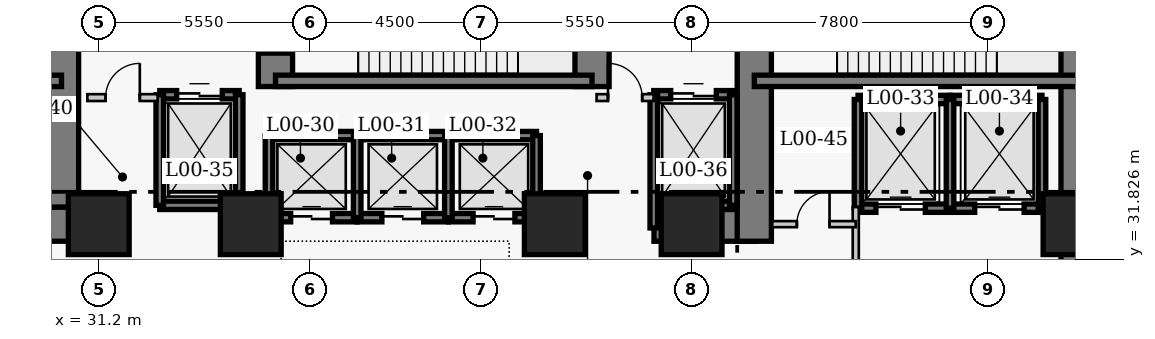
"""IFC4 building model, lengths in metres.
Left out: names, types, materials, properties, quantities, classifications, styles, units other than length and angle.
Written with IfcOpenShell. Run it as: python <this file> out.ifc"""

import sys

from ifc_helpers import new_model, si_unit, direction, frame, frame_2d, origin, origin_2d, place, context, subcontext, project, spatial, rectangle, extrude, element, fill, save


model = new_model("IFC4")
c1 = context("Model", 3, precision=1e-05, world=origin(), true_north=direction((0.0, 1.0)))
c2 = subcontext(c1, "Body", "Model", "MODEL_VIEW")
j1 = project(units=[si_unit("LENGTHUNIT", "METRE"), si_unit("PLANEANGLEUNIT", "RADIAN")], contexts=[c1])
p1 = place(None, origin())
s1 = spatial("IfcSite", under=j1, at=p1, CompositionType="ELEMENT")
p2 = place(p1, origin())
s2 = spatial("IfcBuilding", under=s1, at=p2, CompositionType="ELEMENT")
p3 = place(p2, origin())
s3 = spatial("IfcBuildingStorey", under=s2, at=p3, CompositionType="ELEMENT", Elevation=0.0)
p4 = place(p3, frame((56.97, 27.05, 0.0), z_axis=(0.0, 0.0, 1.0), x_axis=(0.0, 1.0, 0.0)))
e1 = element("IfcWall", 1, at=p4, inside=s3, PredefinedType="SHEAR", context=c2, shape_type="SweptSolid", body=[
    extrude(rectangle(XDim=13.72, YDim=0.9, at=frame_2d((6.86, 0.0))), origin(), (0.0, 0.0, 1.0), 5.4),
])
p5 = place(p3, frame((28.45, 32.75, 0.0), z_axis=(0.0, 0.0, 1.0), x_axis=(1.0, 0.0, 0.0)))
e2 = element("IfcWall", 2, at=p5, inside=s3, PredefinedType="SHEAR", context=c2, shape_type="SweptSolid", body=[
    extrude(rectangle(XDim=2.4, YDim=0.9, at=frame_2d((1.2, 0.0))), origin(), (0.0, 0.0, 1.0), 5.4),
])
p6 = place(p3, frame((45.81, 32.75, 0.0), z_axis=(0.0, 0.0, 1.0), x_axis=(1.0, 0.0, 0.0)))
e3 = element("IfcWall", 3, at=p6, inside=s3, PredefinedType="SHEAR", context=c2, shape_type="SweptSolid", body=[
    extrude(rectangle(XDim=2.64, YDim=0.9, at=frame_2d((1.32, 0.0))), origin(), (0.0, 0.0, 1.0), 5.4),
])
p7 = place(p3, frame((30.22, 33.2, 0.0), z_axis=(0.0, 0.0, 1.0), x_axis=(0.0, 1.0, 0.0)))
e4 = element("IfcWall", 4, at=p7, inside=s3, PredefinedType="SHEAR", context=c2, shape_type="SweptSolid", body=[
    extrude(rectangle(XDim=7.12, YDim=0.9, at=frame_2d((3.56, 0.0))), origin(), (0.0, 0.0, 1.0), 5.4),
])
p8 = place(p3, frame((35.85, 36.37, 0.0), z_axis=(0.0, 0.0, 1.0), x_axis=(0.0, 1.0, 0.0)))
e5 = element("IfcWall", 5, at=p8, inside=s3, PredefinedType="SHEAR", context=c2, shape_type="SweptSolid", body=[
    extrude(rectangle(XDim=3.95, YDim=0.9, at=frame_2d((1.975, 0.0))), origin(), (0.0, 0.0, 1.0), 5.4),
])
p9 = place(p8, frame((0.88, 0.0, 0.0)))
e6 = element("IfcOpeningElement", 6, at=p9, cuts=e5, PredefinedType="OPENING", context=c2, shape_type="SweptSolid", body=[
    extrude(rectangle(XDim=1.1, YDim=2.15, at=frame_2d((0.55, 1.075))), frame((0.0, 0.46, 0.0), z_axis=(0.0, -1.0, 0.0), x_axis=(1.0, 0.0, 0.0)), (0.0, 0.0, 1.0), 0.92),
])
p10 = place(p3, frame((44.18, 36.37, 0.0), z_axis=(0.0, 0.0, 1.0), x_axis=(0.0, 1.0, 0.0)))
e7 = element("IfcWall", 7, at=p10, inside=s3, PredefinedType="SHEAR", context=c2, shape_type="SweptSolid", body=[
    extrude(rectangle(XDim=3.95, YDim=0.9, at=frame_2d((1.975, 0.0))), origin(), (0.0, 0.0, 1.0), 5.4),
])
p11 = place(p3, frame((48.45, 32.3, 0.0), z_axis=(0.0, 0.0, 1.0), x_axis=(0.0, 1.0, 0.0)))
e8 = element("IfcWall", 8, at=p11, inside=s3, PredefinedType="SHEAR", context=c2, shape_type="SweptSolid", body=[
    extrude(rectangle(XDim=8.02, YDim=0.9, at=frame_2d((4.01, 0.0))), origin(), (0.0, 0.0, 1.0), 5.4),
])
p12 = place(p11, frame((5.9, 0.0, 0.0)))
e9 = element("IfcOpeningElement", 9, at=p12, cuts=e8, PredefinedType="OPENING", context=c2, shape_type="SweptSolid", body=[
    extrude(rectangle(XDim=1.1, YDim=2.15, at=frame_2d((0.55, 1.075))), frame((0.0, 0.46, 0.0), z_axis=(0.0, -1.0, 0.0), x_axis=(1.0, 0.0, 0.0)), (0.0, 0.0, 1.0), 0.92),
])
p13 = place(p3, frame((21.9, 36.52, 0.0), z_axis=(0.0, 0.0, 1.0), x_axis=(1.0, 0.0, 0.0)))
e10 = element("IfcWall", 10, at=p13, inside=s3, PredefinedType="SHEAR", context=c2, shape_type="SweptSolid", body=[
    extrude(rectangle(XDim=8.32, YDim=0.3, at=frame_2d((4.16, 0.0))), origin(), (0.0, 0.0, 1.0), 5.4),
])
p14 = place(p13, frame((0.9, 0.0, 0.0)))
e11 = element("IfcOpeningElement", 11, at=p14, cuts=e10, PredefinedType="OPENING", context=c2, shape_type="SweptSolid", body=[
    extrude(rectangle(XDim=1.1, YDim=2.15, at=frame_2d((0.55, 1.075))), frame((0.0, 0.16, 0.0), z_axis=(0.0, -1.0, 0.0), x_axis=(1.0, 0.0, 0.0)), (0.0, 0.0, 1.0), 0.32),
])
p15 = place(p3, frame((35.85, 36.52, 0.0), z_axis=(0.0, 0.0, 1.0), x_axis=(1.0, 0.0, 0.0)))
e12 = element("IfcWall", 12, at=p15, inside=s3, PredefinedType="SHEAR", context=c2, shape_type="SweptSolid", body=[
    extrude(rectangle(XDim=8.33, YDim=0.3, at=frame_2d((4.165, 0.0))), origin(), (0.0, 0.0, 1.0), 5.4),
])
p16 = place(p3, frame((48.45, 36.52, 0.0), z_axis=(0.0, 0.0, 1.0), x_axis=(1.0, 0.0, 0.0)))
e13 = element("IfcWall", 13, at=p16, inside=s3, PredefinedType="SHEAR", context=c2, shape_type="SweptSolid", body=[
    extrude(rectangle(XDim=8.52, YDim=0.3, at=frame_2d((4.26, 0.0))), origin(), (0.0, 0.0, 1.0), 5.4),
])
for number, where, z_axis, x_axis in (
    (14, (31.2, 32.75, 0.0), (0.0, 0.0, 1.0), (1.0, 0.0, 0.0)),
    (15, (35.2, 32.75, 0.0), (0.0, 0.0, 1.0), (1.0, 0.0, 0.0)),
    (16, (43.2, 32.75, 0.0), (0.0, 0.0, 1.0), (1.0, 0.0, 0.0)),
    (17, (46.8, 32.75, 0.0), (0.0, 0.0, 1.0), (1.0, 0.0, 0.0)),
    (18, (56.85, 32.75, 0.0), (0.0, 0.0, 1.0), (1.0, 0.0, 0.0)),
):
    element("IfcColumn", number, at=place(p3, frame(where, z_axis=z_axis, x_axis=x_axis)), inside=s3, PredefinedType="COLUMN", context=c2, shape_type="SweptSolid", body=[
        extrude(rectangle(XDim=1.6, YDim=1.6, at=origin_2d()), origin(), (0.0, 0.0, 1.0), 5.4),
    ])
p17 = place(p3, frame((35.68, 35.08, 0.0), z_axis=(0.0, 0.0, 1.0), x_axis=(1.0, 0.0, 0.0)))
e19 = element("IfcWall", 19, at=p17, inside=s3, PredefinedType="SHEAR", context=c2, shape_type="SweptSolid", body=[
    extrude(rectangle(XDim=2.32, YDim=0.22, at=frame_2d((1.16, 0.0))), origin(), (0.0, 0.0, 1.0), 5.4),
])
p18 = place(p3, frame((35.68, 32.92, 0.0), z_axis=(0.0, 0.0, 1.0), x_axis=(1.0, 0.0, 0.0)))
e20 = element("IfcWall", 20, at=p18, inside=s3, PredefinedType="SHEAR", context=c2, shape_type="SweptSolid", body=[
    extrude(rectangle(XDim=2.32, YDim=0.22, at=frame_2d((1.16, 0.0))), origin(), (0.0, 0.0, 1.0), 5.4),
])
p19 = place(p18, frame((0.57, 0.0, 0.0)))
e21 = element("IfcOpeningElement", 21, at=p19, cuts=e20, PredefinedType="OPENING", context=c2, shape_type="SweptSolid", body=[
    extrude(rectangle(XDim=1.1, YDim=2.15, at=frame_2d((0.55, 1.075))), frame((0.0, 0.12, 0.0), z_axis=(0.0, -1.0, 0.0), x_axis=(1.0, 0.0, 0.0)), (0.0, 0.0, 1.0), 0.24),
])
p20 = place(p3, frame((35.68, 32.92, 0.0), z_axis=(0.0, 0.0, 1.0), x_axis=(0.0, 1.0, 0.0)))
e22 = element("IfcWall", 22, at=p20, inside=s3, PredefinedType="SHEAR", context=c2, shape_type="SweptSolid", body=[
    extrude(rectangle(XDim=2.16, YDim=0.2, at=frame_2d((1.08, 0.0))), origin(), (0.0, 0.0, 1.0), 5.4),
])
p21 = place(p3, frame((38.0, 35.08, 0.0), z_axis=(0.0, 0.0, 1.0), x_axis=(1.0, 0.0, 0.0)))
e23 = element("IfcWall", 23, at=p21, inside=s3, PredefinedType="SHEAR", context=c2, shape_type="SweptSolid", body=[
    extrude(rectangle(XDim=2.4, YDim=0.22, at=frame_2d((1.2, 0.0))), origin(), (0.0, 0.0, 1.0), 5.4),
])
p22 = place(p3, frame((38.0, 32.92, 0.0), z_axis=(0.0, 0.0, 1.0), x_axis=(1.0, 0.0, 0.0)))
e24 = element("IfcWall", 24, at=p22, inside=s3, PredefinedType="SHEAR", context=c2, shape_type="SweptSolid", body=[
    extrude(rectangle(XDim=2.4, YDim=0.22, at=frame_2d((1.2, 0.0))), origin(), (0.0, 0.0, 1.0), 5.4),
])
p23 = place(p22, frame((0.65, 0.0, 0.0)))
e25 = element("IfcOpeningElement", 25, at=p23, cuts=e24, PredefinedType="OPENING", context=c2, shape_type="SweptSolid", body=[
    extrude(rectangle(XDim=1.1, YDim=2.15, at=frame_2d((0.55, 1.075))), frame((0.0, 0.12, 0.0), z_axis=(0.0, -1.0, 0.0), x_axis=(1.0, 0.0, 0.0)), (0.0, 0.0, 1.0), 0.24),
])
p24 = place(p3, frame((38.0, 32.92, 0.0), z_axis=(0.0, 0.0, 1.0), x_axis=(0.0, 1.0, 0.0)))
e26 = element("IfcWall", 26, at=p24, inside=s3, PredefinedType="SHEAR", context=c2, shape_type="SweptSolid", body=[
    extrude(rectangle(XDim=2.16, YDim=0.2, at=frame_2d((1.08, 0.0))), origin(), (0.0, 0.0, 1.0), 5.4),
])
p25 = place(p3, frame((40.4, 35.08, 0.0), z_axis=(0.0, 0.0, 1.0), x_axis=(1.0, 0.0, 0.0)))
e27 = element("IfcWall", 27, at=p25, inside=s3, PredefinedType="SHEAR", context=c2, shape_type="SweptSolid", body=[
    extrude(rectangle(XDim=2.32, YDim=0.22, at=frame_2d((1.16, 0.0))), origin(), (0.0, 0.0, 1.0), 5.4),
])
p26 = place(p3, frame((40.4, 32.92, 0.0), z_axis=(0.0, 0.0, 1.0), x_axis=(1.0, 0.0, 0.0)))
e28 = element("IfcWall", 28, at=p26, inside=s3, PredefinedType="SHEAR", context=c2, shape_type="SweptSolid", body=[
    extrude(rectangle(XDim=2.32, YDim=0.22, at=frame_2d((1.16, 0.0))), origin(), (0.0, 0.0, 1.0), 5.4),
])
p27 = place(p26, frame((0.65, 0.0, 0.0)))
e29 = element("IfcOpeningElement", 29, at=p27, cuts=e28, PredefinedType="OPENING", context=c2, shape_type="SweptSolid", body=[
    extrude(rectangle(XDim=1.1, YDim=2.15, at=frame_2d((0.55, 1.075))), frame((0.0, 0.12, 0.0), z_axis=(0.0, -1.0, 0.0), x_axis=(1.0, 0.0, 0.0)), (0.0, 0.0, 1.0), 0.24),
])
for number, where, z_axis, x_axis in (
    (30, (40.4, 32.92, 0.0), (0.0, 0.0, 1.0), (0.0, 1.0, 0.0)),
    (31, (42.72, 32.92, 0.0), (0.0, 0.0, 1.0), (0.0, 1.0, 0.0)),
):
    element("IfcWall", number, at=place(p3, frame(where, z_axis=z_axis, x_axis=x_axis)), inside=s3, PredefinedType="SHEAR", context=c2, shape_type="SweptSolid", body=[
        extrude(rectangle(XDim=2.16, YDim=0.2, at=frame_2d((1.08, 0.0))), origin(), (0.0, 0.0, 1.0), 5.4),
    ])
p28 = place(p3, frame((51.18, 36.03, 0.0), z_axis=(0.0, 0.0, 1.0), x_axis=(1.0, 0.0, 0.0)))
e32 = element("IfcWall", 32, at=p28, inside=s3, PredefinedType="SHEAR", context=c2, shape_type="SweptSolid", body=[
    extrude(rectangle(XDim=2.42, YDim=0.22, at=frame_2d((1.21, 0.0))), origin(), (0.0, 0.0, 1.0), 5.4),
])
p29 = place(p3, frame((51.18, 33.17, 0.0), z_axis=(0.0, 0.0, 1.0), x_axis=(1.0, 0.0, 0.0)))
e33 = element("IfcWall", 33, at=p29, inside=s3, PredefinedType="SHEAR", context=c2, shape_type="SweptSolid", body=[
    extrude(rectangle(XDim=2.42, YDim=0.22, at=frame_2d((1.21, 0.0))), origin(), (0.0, 0.0, 1.0), 5.4),
])
p30 = place(p29, frame((0.47, 0.0, 0.0)))
e34 = element("IfcOpeningElement", 34, at=p30, cuts=e33, PredefinedType="OPENING", context=c2, shape_type="SweptSolid", body=[
    extrude(rectangle(XDim=1.3, YDim=2.15, at=frame_2d((0.65, 1.075))), frame((0.0, 0.12, 0.0), z_axis=(0.0, -1.0, 0.0), x_axis=(1.0, 0.0, 0.0)), (0.0, 0.0, 1.0), 0.24),
])
p31 = place(p3, frame((51.18, 33.17, 0.0), z_axis=(0.0, 0.0, 1.0), x_axis=(0.0, 1.0, 0.0)))
e35 = element("IfcWall", 35, at=p31, inside=s3, PredefinedType="SHEAR", context=c2, shape_type="SweptSolid", body=[
    extrude(rectangle(XDim=2.86, YDim=0.2, at=frame_2d((1.43, 0.0))), origin(), (0.0, 0.0, 1.0), 5.4),
])
p32 = place(p3, frame((53.6, 36.03, 0.0), z_axis=(0.0, 0.0, 1.0), x_axis=(1.0, 0.0, 0.0)))
e36 = element("IfcWall", 36, at=p32, inside=s3, PredefinedType="SHEAR", context=c2, shape_type="SweptSolid", body=[
    extrude(rectangle(XDim=2.42, YDim=0.22, at=frame_2d((1.21, 0.0))), origin(), (0.0, 0.0, 1.0), 5.4),
])
p33 = place(p3, frame((53.6, 33.17, 0.0), z_axis=(0.0, 0.0, 1.0), x_axis=(1.0, 0.0, 0.0)))
e37 = element("IfcWall", 37, at=p33, inside=s3, PredefinedType="SHEAR", context=c2, shape_type="SweptSolid", body=[
    extrude(rectangle(XDim=2.42, YDim=0.22, at=frame_2d((1.21, 0.0))), origin(), (0.0, 0.0, 1.0), 5.4),
])
p34 = place(p33, frame((0.65, 0.0, 0.0)))
e38 = element("IfcOpeningElement", 38, at=p34, cuts=e37, PredefinedType="OPENING", context=c2, shape_type="SweptSolid", body=[
    extrude(rectangle(XDim=1.3, YDim=2.15, at=frame_2d((0.65, 1.075))), frame((0.0, 0.12, 0.0), z_axis=(0.0, -1.0, 0.0), x_axis=(1.0, 0.0, 0.0)), (0.0, 0.0, 1.0), 0.24),
])
for number, where, z_axis, x_axis in (
    (39, (53.6, 33.17, 0.0), (0.0, 0.0, 1.0), (0.0, 1.0, 0.0)),
    (40, (56.02, 33.17, 0.0), (0.0, 0.0, 1.0), (0.0, 1.0, 0.0)),
):
    element("IfcWall", number, at=place(p3, frame(where, z_axis=z_axis, x_axis=x_axis)), inside=s3, PredefinedType="SHEAR", context=c2, shape_type="SweptSolid", body=[
        extrude(rectangle(XDim=2.86, YDim=0.2, at=frame_2d((1.43, 0.0))), origin(), (0.0, 0.0, 1.0), 5.4),
    ])
p35 = place(p3, frame((32.805, 36.155, 0.0), z_axis=(0.0, 0.0, 1.0), x_axis=(1.0, 0.0, 0.0)))
e41 = element("IfcWall", 41, at=p35, inside=s3, PredefinedType="SHEAR", context=c2, shape_type="SweptSolid", body=[
    extrude(rectangle(XDim=2.09, YDim=0.22, at=frame_2d((1.045, 0.0))), origin(), (0.0, 0.0, 1.0), 5.4),
])
p36 = place(p35, frame((0.445, 0.0, 0.0)))
e42 = element("IfcOpeningElement", 42, at=p36, cuts=e41, PredefinedType="OPENING", context=c2, shape_type="SweptSolid", body=[
    extrude(rectangle(XDim=1.2, YDim=2.15, at=frame_2d((0.6, 1.075))), frame((0.0, 0.12, 0.0), z_axis=(0.0, -1.0, 0.0), x_axis=(1.0, 0.0, 0.0)), (0.0, 0.0, 1.0), 0.24),
])
p37 = place(p3, frame((32.805, 33.245, 0.0), z_axis=(0.0, 0.0, 1.0), x_axis=(1.0, 0.0, 0.0)))
e43 = element("IfcWall", 43, at=p37, inside=s3, PredefinedType="SHEAR", context=c2, shape_type="SweptSolid", body=[
    extrude(rectangle(XDim=2.09, YDim=0.22, at=frame_2d((1.045, 0.0))), origin(), (0.0, 0.0, 1.0), 5.4),
])
for number, where, z_axis, x_axis in (
    (44, (32.805, 33.245, 0.0), (0.0, 0.0, 1.0), (0.0, 1.0, 0.0)),
    (45, (34.895, 33.245, 0.0), (0.0, 0.0, 1.0), (0.0, 1.0, 0.0)),
):
    element("IfcWall", number, at=place(p3, frame(where, z_axis=z_axis, x_axis=x_axis)), inside=s3, PredefinedType="SHEAR", context=c2, shape_type="SweptSolid", body=[
        extrude(rectangle(XDim=2.91, YDim=0.2, at=frame_2d((1.455, 0.0))), origin(), (0.0, 0.0, 1.0), 5.4),
    ])
p38 = place(p3, frame((45.805, 36.155, 0.0), z_axis=(0.0, 0.0, 1.0), x_axis=(1.0, 0.0, 0.0)))
e46 = element("IfcWall", 46, at=p38, inside=s3, PredefinedType="SHEAR", context=c2, shape_type="SweptSolid", body=[
    extrude(rectangle(XDim=2.09, YDim=0.22, at=frame_2d((1.045, 0.0))), origin(), (0.0, 0.0, 1.0), 5.4),
])
p39 = place(p38, frame((0.445, 0.0, 0.0)))
e47 = element("IfcOpeningElement", 47, at=p39, cuts=e46, PredefinedType="OPENING", context=c2, shape_type="SweptSolid", body=[
    extrude(rectangle(XDim=1.2, YDim=2.15, at=frame_2d((0.6, 1.075))), frame((0.0, 0.12, 0.0), z_axis=(0.0, -1.0, 0.0), x_axis=(1.0, 0.0, 0.0)), (0.0, 0.0, 1.0), 0.24),
])
p40 = place(p3, frame((45.805, 33.245, 0.0), z_axis=(0.0, 0.0, 1.0), x_axis=(1.0, 0.0, 0.0)))
e48 = element("IfcWall", 48, at=p40, inside=s3, PredefinedType="SHEAR", context=c2, shape_type="SweptSolid", body=[
    extrude(rectangle(XDim=2.09, YDim=0.22, at=frame_2d((1.045, 0.0))), origin(), (0.0, 0.0, 1.0), 5.4),
])
p41 = place(p3, frame((45.805, 32.65, 0.0), z_axis=(0.0, 0.0, 1.0), x_axis=(0.0, 1.0, 0.0)))
e49 = element("IfcWall", 49, at=p41, inside=s3, PredefinedType="SHEAR", context=c2, shape_type="SweptSolid", body=[
    extrude(rectangle(XDim=3.505, YDim=0.2, at=frame_2d((1.752, 0.0))), origin(), (0.0, 0.0, 1.0), 5.4),
])
p42 = place(p3, frame((47.895, 33.245, 0.0), z_axis=(0.0, 0.0, 1.0), x_axis=(0.0, 1.0, 0.0)))
e50 = element("IfcWall", 50, at=p42, inside=s3, PredefinedType="SHEAR", context=c2, shape_type="SweptSolid", body=[
    extrude(rectangle(XDim=2.91, YDim=0.2, at=frame_2d((1.455, 0.0))), origin(), (0.0, 0.0, 1.0), 5.4),
])
p43 = place(p3, frame((30.9, 36.08, 0.0), z_axis=(0.0, 0.0, 1.0), x_axis=(1.0, 0.0, 0.0)))
e51 = element("IfcWall", 51, at=p43, inside=s3, PredefinedType="PARTITIONING", context=c2, shape_type="SweptSolid", body=[
    extrude(rectangle(XDim=1.85, YDim=0.18, at=frame_2d((0.925, 0.0))), origin(), (0.0, 0.0, 1.0), 5.1),
])
p44 = place(p43, frame((0.48, 0.0, 0.0)))
e52 = element("IfcOpeningElement", 52, at=p44, cuts=e51, PredefinedType="OPENING", context=c2, shape_type="SweptSolid", body=[
    extrude(rectangle(XDim=0.9, YDim=2.15, at=frame_2d((0.45, 1.075))), frame((0.0, 0.1, 0.0), z_axis=(0.0, -1.0, 0.0), x_axis=(1.0, 0.0, 0.0)), (0.0, 0.0, 1.0), 0.2),
])
p45 = place(p3, frame((44.3, 36.08, 0.0), z_axis=(0.0, 0.0, 1.0), x_axis=(1.0, 0.0, 0.0)))
e53 = element("IfcWall", 53, at=p45, inside=s3, PredefinedType="PARTITIONING", context=c2, shape_type="SweptSolid", body=[
    extrude(rectangle(XDim=1.5, YDim=0.18, at=frame_2d((0.75, 0.0))), origin(), (0.0, 0.0, 1.0), 5.1),
])
p46 = place(p45, frame((0.3, 0.0, 0.0)))
e54 = element("IfcOpeningElement", 54, at=p46, cuts=e53, PredefinedType="OPENING", context=c2, shape_type="SweptSolid", body=[
    extrude(rectangle(XDim=0.9, YDim=2.15, at=frame_2d((0.45, 1.075))), frame((0.0, 0.1, 0.0), z_axis=(0.0, -1.0, 0.0), x_axis=(1.0, 0.0, 0.0)), (0.0, 0.0, 1.0), 0.2),
])
p47 = place(p3, frame((51.12, 29.5, 0.0), z_axis=(0.0, 0.0, 1.0), x_axis=(0.0, 1.0, 0.0)))
e55 = element("IfcWall", 55, at=p47, inside=s3, PredefinedType="PARTITIONING", context=c2, shape_type="SweptSolid", body=[
    extrude(rectangle(XDim=3.7, YDim=0.16, at=frame_2d((1.85, 0.0))), origin(), (0.0, 0.0, 1.0), 5.1),
])
p48 = place(p47, frame((0.9, 0.0, 0.0)))
e56 = element("IfcOpeningElement", 56, at=p48, cuts=e55, PredefinedType="OPENING", context=c2, shape_type="SweptSolid", body=[
    extrude(rectangle(XDim=1.1, YDim=2.15, at=frame_2d((0.55, 1.075))), frame((0.0, 0.09, 0.0), z_axis=(0.0, -1.0, 0.0), x_axis=(1.0, 0.0, 0.0)), (0.0, 0.0, 1.0), 0.18),
])
p49 = place(p3, frame((48.92, 32.75, 0.0), z_axis=(0.0, 0.0, 1.0), x_axis=(1.0, 0.0, 0.0)))
e57 = element("IfcWall", 57, at=p49, inside=s3, PredefinedType="PARTITIONING", context=c2, shape_type="SweptSolid", body=[
    extrude(rectangle(XDim=2.2, YDim=0.16, at=frame_2d((1.1, 0.0))), origin(), (0.0, 0.0, 1.0), 5.1),
])
p50 = place(p49, frame((0.65, 0.0, 0.0)))
e58 = element("IfcOpeningElement", 58, at=p50, cuts=e57, PredefinedType="OPENING", context=c2, shape_type="SweptSolid", body=[
    extrude(rectangle(XDim=0.86, YDim=2.05, at=frame_2d((0.43, 1.025))), frame((0.0, 0.09, 0.0), z_axis=(0.0, -1.0, 0.0), x_axis=(1.0, 0.0, 0.0)), (0.0, 0.0, 1.0), 0.18),
])
p51 = place(p19, origin())
e59 = element("IfcDoor", 59, at=p51, inside=s3, OperationType="DOUBLE_DOOR_SLIDING", PredefinedType="DOOR", context=c2, shape_type="SweptSolid", body=[
    extrude(rectangle(XDim=1.1, YDim=2.15, at=frame_2d((0.55, 1.075))), frame((0.0, 0.025, 0.0), z_axis=(0.0, -1.0, 0.0), x_axis=(1.0, 0.0, 0.0)), (0.0, 0.0, 1.0), 0.05),
])
fill(e21, e59)
p52 = place(p23, origin())
e60 = element("IfcDoor", 60, at=p52, inside=s3, OperationType="DOUBLE_DOOR_SLIDING", PredefinedType="DOOR", context=c2, shape_type="SweptSolid", body=[
    extrude(rectangle(XDim=1.1, YDim=2.15, at=frame_2d((0.55, 1.075))), frame((0.0, 0.025, 0.0), z_axis=(0.0, -1.0, 0.0), x_axis=(1.0, 0.0, 0.0)), (0.0, 0.0, 1.0), 0.05),
])
fill(e25, e60)
p53 = place(p27, origin())
e61 = element("IfcDoor", 61, at=p53, inside=s3, OperationType="DOUBLE_DOOR_SLIDING", PredefinedType="DOOR", context=c2, shape_type="SweptSolid", body=[
    extrude(rectangle(XDim=1.1, YDim=2.15, at=frame_2d((0.55, 1.075))), frame((0.0, 0.025, 0.0), z_axis=(0.0, -1.0, 0.0), x_axis=(1.0, 0.0, 0.0)), (0.0, 0.0, 1.0), 0.05),
])
fill(e29, e61)
p54 = place(p30, origin())
e62 = element("IfcDoor", 62, at=p54, inside=s3, OperationType="DOUBLE_DOOR_SLIDING", PredefinedType="DOOR", context=c2, shape_type="SweptSolid", body=[
    extrude(rectangle(XDim=1.3, YDim=2.15, at=frame_2d((0.65, 1.075))), frame((0.0, 0.025, 0.0), z_axis=(0.0, -1.0, 0.0), x_axis=(1.0, 0.0, 0.0)), (0.0, 0.0, 1.0), 0.05),
])
fill(e34, e62)
p55 = place(p34, origin())
e63 = element("IfcDoor", 63, at=p55, inside=s3, OperationType="DOUBLE_DOOR_SLIDING", PredefinedType="DOOR", context=c2, shape_type="SweptSolid", body=[
    extrude(rectangle(XDim=1.3, YDim=2.15, at=frame_2d((0.65, 1.075))), frame((0.0, 0.025, 0.0), z_axis=(0.0, -1.0, 0.0), x_axis=(1.0, 0.0, 0.0)), (0.0, 0.0, 1.0), 0.05),
])
fill(e38, e63)
p56 = place(p36, origin())
e64 = element("IfcDoor", 64, at=p56, inside=s3, OperationType="DOUBLE_DOOR_SLIDING", PredefinedType="DOOR", context=c2, shape_type="SweptSolid", body=[
    extrude(rectangle(XDim=1.2, YDim=2.15, at=frame_2d((0.6, 1.075))), frame((0.0, 0.025, 0.0), z_axis=(0.0, -1.0, 0.0), x_axis=(1.0, 0.0, 0.0)), (0.0, 0.0, 1.0), 0.05),
])
fill(e42, e64)
p57 = place(p39, origin())
e65 = element("IfcDoor", 65, at=p57, inside=s3, OperationType="DOUBLE_DOOR_SLIDING", PredefinedType="DOOR", context=c2, shape_type="SweptSolid", body=[
    extrude(rectangle(XDim=1.2, YDim=2.15, at=frame_2d((0.6, 1.075))), frame((0.0, 0.025, 0.0), z_axis=(0.0, -1.0, 0.0), x_axis=(1.0, 0.0, 0.0)), (0.0, 0.0, 1.0), 0.05),
])
fill(e47, e65)
p58 = place(p44, origin())
e66 = element("IfcDoor", 66, at=p58, inside=s3, OperationType="SINGLE_SWING_RIGHT", PredefinedType="DOOR", context=c2, shape_type="SweptSolid", body=[
    extrude(rectangle(XDim=0.9, YDim=2.15, at=frame_2d((0.45, 1.075))), frame((0.0, 0.025, 0.0), z_axis=(0.0, -1.0, 0.0), x_axis=(1.0, 0.0, 0.0)), (0.0, 0.0, 1.0), 0.05),
])
fill(e52, e66)
p59 = place(p46, origin())
e67 = element("IfcDoor", 67, at=p59, inside=s3, OperationType="SINGLE_SWING_LEFT", PredefinedType="DOOR", context=c2, shape_type="SweptSolid", body=[
    extrude(rectangle(XDim=0.9, YDim=2.15, at=frame_2d((0.45, 1.075))), frame((0.0, 0.025, 0.0), z_axis=(0.0, -1.0, 0.0), x_axis=(1.0, 0.0, 0.0)), (0.0, 0.0, 1.0), 0.05),
])
fill(e54, e67)
p60 = place(p50, origin())
e68 = element("IfcDoor", 68, at=p60, inside=s3, OperationType="SINGLE_SWING_RIGHT", PredefinedType="DOOR", context=c2, shape_type="SweptSolid", body=[
    extrude(rectangle(XDim=0.86, YDim=2.05, at=frame_2d((0.43, 1.025))), frame((0.0, 0.025, 0.0), z_axis=(0.0, -1.0, 0.0), x_axis=(1.0, 0.0, 0.0)), (0.0, 0.0, 1.0), 0.05),
])
fill(e58, e68)
p61 = place(p9, origin())
e69 = element("IfcDoor", 69, at=p61, inside=s3, OperationType="SINGLE_SWING_RIGHT", PredefinedType="DOOR", context=c2, shape_type="SweptSolid", body=[
    extrude(rectangle(XDim=1.1, YDim=2.15, at=frame_2d((0.55, 1.075))), frame((0.0, 0.025, 0.0), z_axis=(0.0, -1.0, 0.0), x_axis=(1.0, 0.0, 0.0)), (0.0, 0.0, 1.0), 0.05),
])
fill(e6, e69)
save(model, sys.argv[1])
